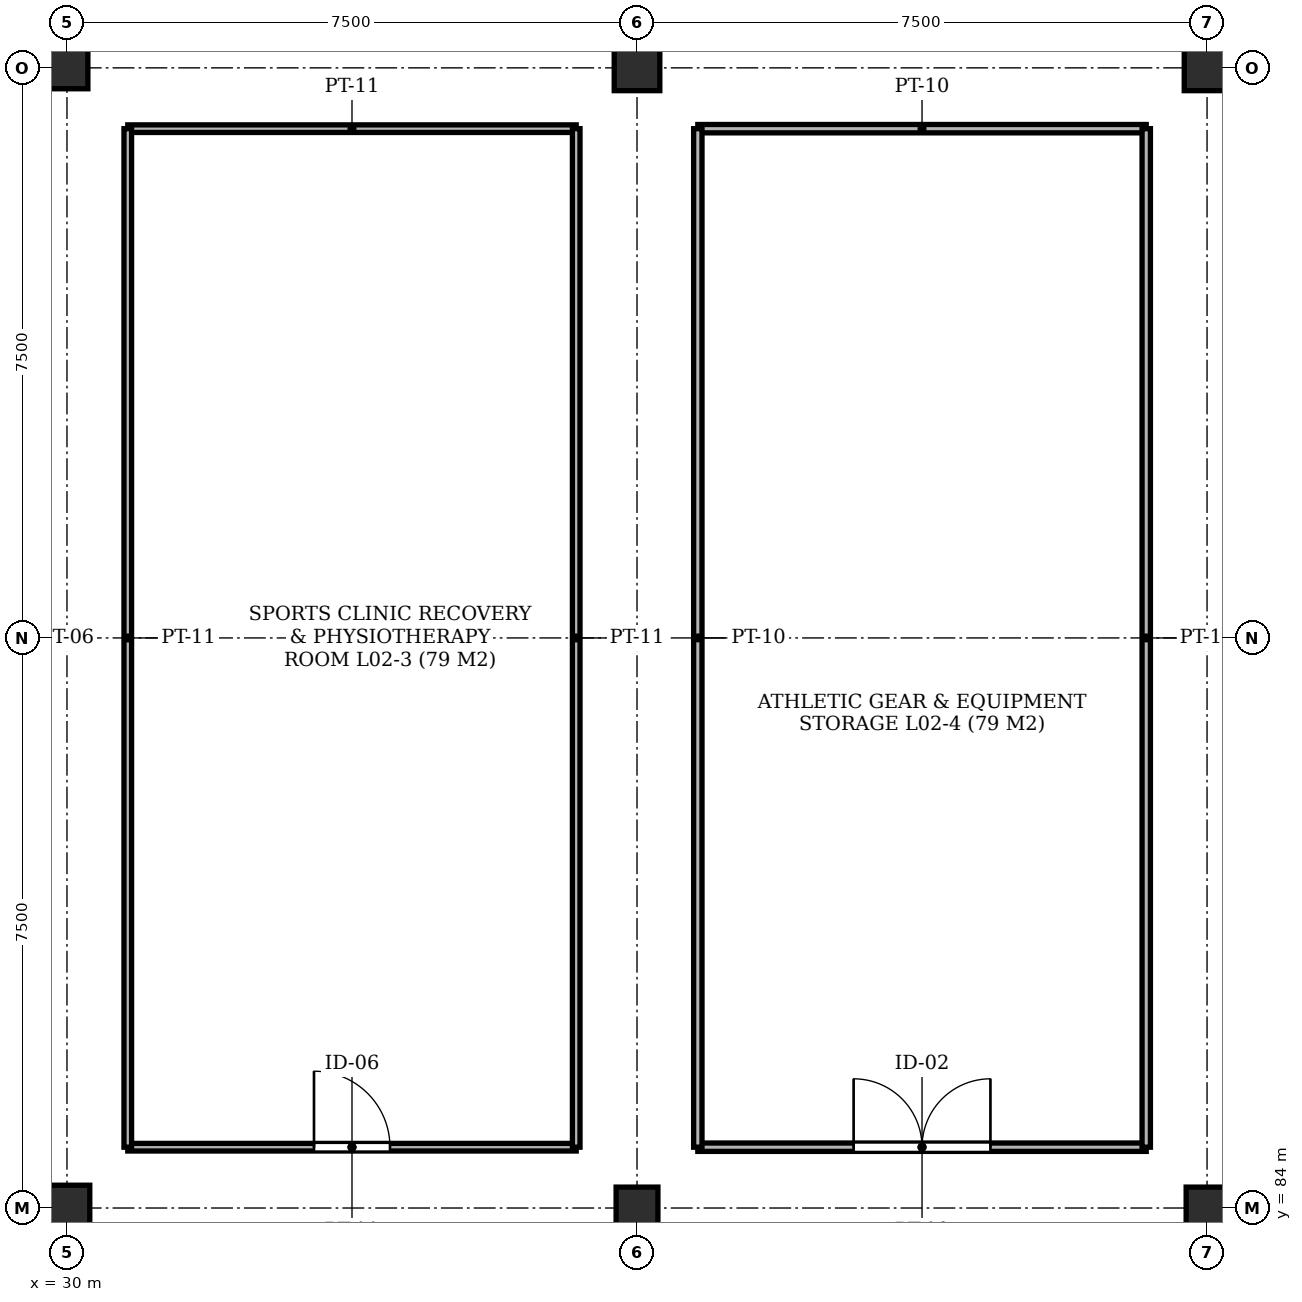
"""IFC4 building model, lengths in metres.
Left out: names, types, materials, properties, quantities, classifications, styles, units other than length and angle.
Written with IfcOpenShell. Run it as: python <this file> out.ifc"""

import sys

from ifc_helpers import new_model, si_unit, direction, frame, frame_2d, origin, origin_2d, place, context, subcontext, project, spatial, rectangle, extrude, element, fill, save


model = new_model("IFC4")
c1 = context("Model", 3, precision=1e-05, world=origin(), true_north=direction((0.0, 1.0)))
c2 = subcontext(c1, "Body", "Model", "MODEL_VIEW")
j1 = project(units=[si_unit("LENGTHUNIT", "METRE"), si_unit("PLANEANGLEUNIT", "RADIAN")], contexts=[c1])
p1 = place(None, origin())
s1 = spatial("IfcSite", under=j1, at=p1, CompositionType="ELEMENT")
p2 = place(p1, origin())
s2 = spatial("IfcBuilding", under=s1, at=p2, CompositionType="ELEMENT")
p3 = place(p2, frame((0.0, 0.0, 9.4)))
s3 = spatial("IfcBuildingStorey", under=s2, at=p3, CompositionType="ELEMENT", Elevation=9.4)
p4 = place(p3, frame((30.0, 84.0, -0.45), z_axis=(0.0, 0.0, 1.0), x_axis=(1.0, 0.0, 0.0)))
e1 = element("IfcColumn", 1, at=p4, inside=s3, PredefinedType="COLUMN", context=c2, shape_type="SweptSolid", body=[
    extrude(rectangle(XDim=0.6, YDim=0.6, at=origin_2d()), origin(), (0.0, 0.0, 1.0), 4.77),
])
for number, where, z_axis, x_axis in (
    (2, (30.0, 99.0, -0.45), (0.0, 0.0, 1.0), (1.0, 0.0, 0.0)),
    (3, (37.5, 84.0, -0.45), (0.0, 0.0, 1.0), (1.0, 0.0, 0.0)),
):
    element("IfcColumn", number, at=place(p3, frame(where, z_axis=z_axis, x_axis=x_axis)), inside=s3, PredefinedType="COLUMN", context=c2, shape_type="SweptSolid", body=[
        extrude(rectangle(XDim=0.55, YDim=0.55, at=origin_2d()), origin(), (0.0, 0.0, 1.0), 4.77),
    ])
p5 = place(p3, frame((37.5, 99.0, -0.45), z_axis=(0.0, 0.0, 1.0), x_axis=(1.0, 0.0, 0.0)))
e4 = element("IfcColumn", 4, at=p5, inside=s3, PredefinedType="COLUMN", context=c2, shape_type="SweptSolid", body=[
    extrude(rectangle(XDim=0.6, YDim=0.6, at=origin_2d()), origin(), (0.0, 0.0, 1.0), 4.77),
])
p6 = place(p3, frame((45.0, 84.0, -0.45), z_axis=(0.0, 0.0, 1.0), x_axis=(1.0, 0.0, 0.0)))
e5 = element("IfcColumn", 5, at=p6, inside=s3, PredefinedType="COLUMN", context=c2, shape_type="SweptSolid", body=[
    extrude(rectangle(XDim=0.55, YDim=0.55, at=origin_2d()), origin(), (0.0, 0.0, 1.0), 4.77),
])
p7 = place(p3, frame((45.0, 99.0, -0.45), z_axis=(0.0, 0.0, 1.0), x_axis=(1.0, 0.0, 0.0)))
e6 = element("IfcColumn", 6, at=p7, inside=s3, PredefinedType="COLUMN", context=c2, shape_type="SweptSolid", body=[
    extrude(rectangle(XDim=0.6, YDim=0.6, at=origin_2d()), origin(), (0.0, 0.0, 1.0), 4.77),
])
p8 = place(p3, frame((30.8, 84.8, 0.0), z_axis=(0.0, 0.0, 1.0), x_axis=(1.0, 0.0, 0.0)))
e7 = element("IfcWall", 7, at=p8, inside=s3, PredefinedType="PARTITIONING", context=c2, shape_type="SweptSolid", body=[
    extrude(rectangle(XDim=5.9, YDim=0.1, at=frame_2d((2.95, 0.0))), origin(), (0.0, 0.0, 1.0), 3.88),
])
p9 = place(p8, frame((2.45, 0.0, 0.0)))
e8 = element("IfcOpeningElement", 8, at=p9, cuts=e7, PredefinedType="OPENING", context=c2, shape_type="SweptSolid", body=[
    extrude(rectangle(XDim=1.0, YDim=2.15, at=frame_2d((0.5, 1.075))), frame((0.0, 0.062, 0.0), z_axis=(0.0, -1.0, 0.0), x_axis=(1.0, 0.0, 0.0)), (0.0, 0.0, 1.0), 0.124),
])
p10 = place(p3, frame((30.8, 98.2, 0.0), z_axis=(0.0, 0.0, 1.0), x_axis=(1.0, 0.0, 0.0)))
e9 = element("IfcWall", 9, at=p10, inside=s3, PredefinedType="PARTITIONING", context=c2, shape_type="SweptSolid", body=[
    extrude(rectangle(XDim=5.9, YDim=0.1, at=frame_2d((2.95, 0.0))), origin(), (0.0, 0.0, 1.0), 3.88),
])
for number, where, z_axis, x_axis in (
    (10, (30.8, 84.8, 0.0), (0.0, 0.0, 1.0), (0.0, 1.0, 0.0)),
    (11, (36.7, 84.8, 0.0), (0.0, 0.0, 1.0), (0.0, 1.0, 0.0)),
):
    element("IfcWall", number, at=place(p3, frame(where, z_axis=z_axis, x_axis=x_axis)), inside=s3, PredefinedType="PARTITIONING", context=c2, shape_type="SweptSolid", body=[
        extrude(rectangle(XDim=13.4, YDim=0.1, at=frame_2d((6.7, 0.0))), origin(), (0.0, 0.0, 1.0), 3.88),
    ])
p11 = place(p3, frame((38.3, 84.8, 0.0), z_axis=(0.0, 0.0, 1.0), x_axis=(1.0, 0.0, 0.0)))
e12 = element("IfcWall", 12, at=p11, inside=s3, PredefinedType="PARTITIONING", context=c2, shape_type="SweptSolid", body=[
    extrude(rectangle(XDim=5.9, YDim=0.11, at=frame_2d((2.95, 0.0))), origin(), (0.0, 0.0, 1.0), 3.88),
])
p12 = place(p11, frame((2.05, 0.0, 0.0)))
e13 = element("IfcOpeningElement", 13, at=p12, cuts=e12, PredefinedType="OPENING", context=c2, shape_type="SweptSolid", body=[
    extrude(rectangle(XDim=1.8, YDim=2.25, at=frame_2d((0.9, 1.125))), frame((0.0, 0.067, 0.0), z_axis=(0.0, -1.0, 0.0), x_axis=(1.0, 0.0, 0.0)), (0.0, 0.0, 1.0), 0.134),
])
p13 = place(p3, frame((38.3, 98.2, 0.0), z_axis=(0.0, 0.0, 1.0), x_axis=(1.0, 0.0, 0.0)))
e14 = element("IfcWall", 14, at=p13, inside=s3, PredefinedType="PARTITIONING", context=c2, shape_type="SweptSolid", body=[
    extrude(rectangle(XDim=5.9, YDim=0.11, at=frame_2d((2.95, 0.0))), origin(), (0.0, 0.0, 1.0), 3.88),
])
for number, where, z_axis, x_axis in (
    (15, (38.3, 84.8, 0.0), (0.0, 0.0, 1.0), (0.0, 1.0, 0.0)),
    (16, (44.2, 84.8, 0.0), (0.0, 0.0, 1.0), (0.0, 1.0, 0.0)),
):
    element("IfcWall", number, at=place(p3, frame(where, z_axis=z_axis, x_axis=x_axis)), inside=s3, PredefinedType="PARTITIONING", context=c2, shape_type="SweptSolid", body=[
        extrude(rectangle(XDim=13.4, YDim=0.11, at=frame_2d((6.7, 0.0))), origin(), (0.0, 0.0, 1.0), 3.88),
    ])
p14 = place(p9, origin())
e17 = element("IfcDoor", 17, at=p14, inside=s3, OperationType="SINGLE_SWING_LEFT", PredefinedType="DOOR", context=c2, shape_type="SweptSolid", body=[
    extrude(rectangle(XDim=1.0, YDim=2.15, at=frame_2d((0.5, 1.075))), frame((0.0, 0.025, 0.0), z_axis=(0.0, -1.0, 0.0), x_axis=(1.0, 0.0, 0.0)), (0.0, 0.0, 1.0), 0.05),
])
fill(e8, e17)
p15 = place(p12, origin())
e18 = element("IfcDoor", 18, at=p15, inside=s3, OperationType="DOUBLE_DOOR_SINGLE_SWING", PredefinedType="DOOR", context=c2, shape_type="SweptSolid", body=[
    extrude(rectangle(XDim=1.8, YDim=2.25, at=frame_2d((0.9, 1.125))), frame((0.0, 0.025, 0.0), z_axis=(0.0, -1.0, 0.0), x_axis=(1.0, 0.0, 0.0)), (0.0, 0.0, 1.0), 0.05),
])
fill(e13, e18)
save(model, sys.argv[1])
